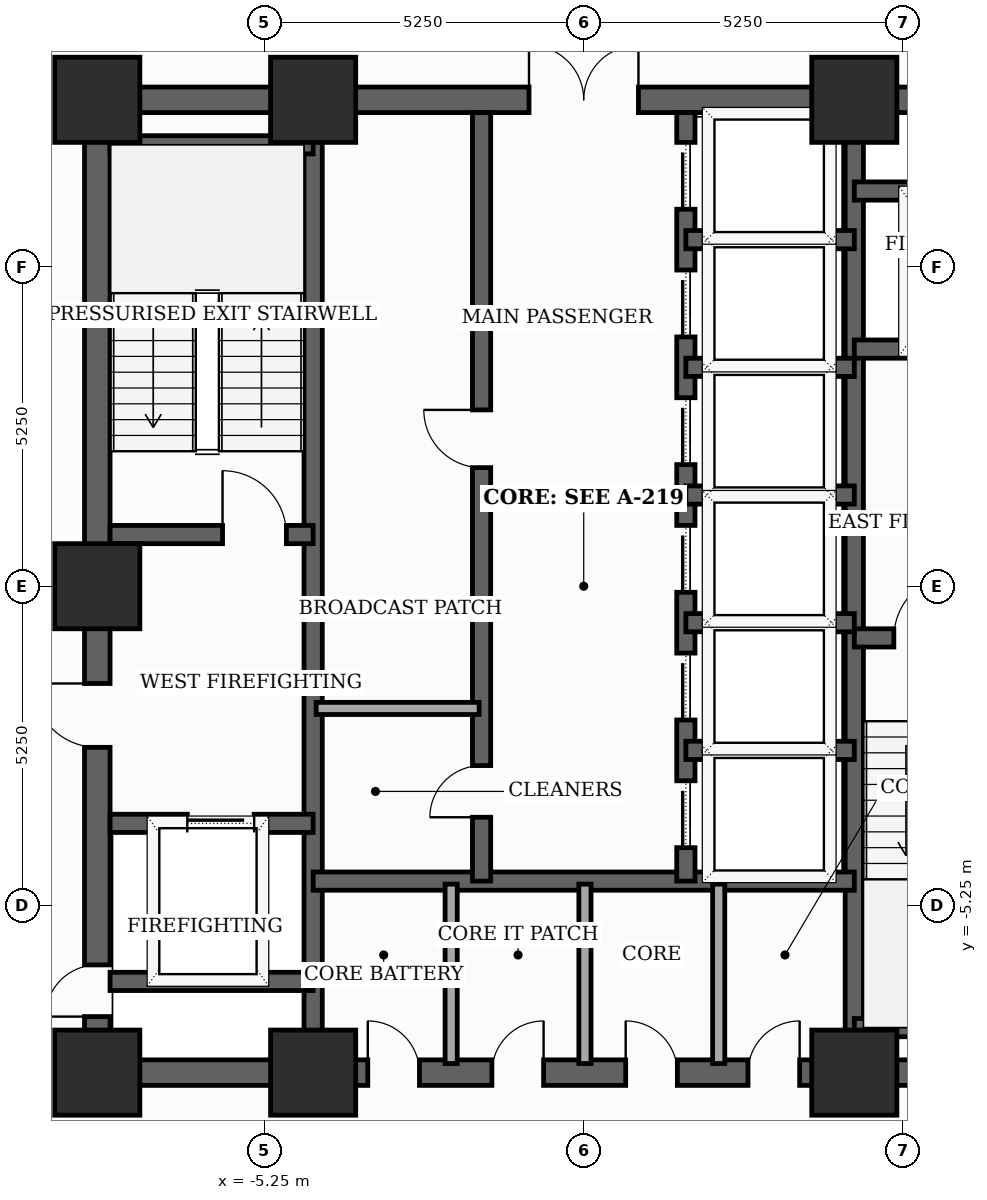
"""IFC4 building model, lengths in metres.
Left out: names, types, materials, properties, quantities, classifications, styles, units other than length and angle.
Written with IfcOpenShell. Run it as: python <this file> out.ifc"""

import sys

from ifc_helpers import new_model, si_unit, direction, frame, frame_2d, origin, origin_2d, place, context, subcontext, project, spatial, rectangle, extrude, element, fill, save


model = new_model("IFC4")
c1 = context("Model", 3, precision=1e-05, world=origin(), true_north=direction((0.0, 1.0)))
c2 = subcontext(c1, "Body", "Model", "MODEL_VIEW")
j1 = project(units=[si_unit("LENGTHUNIT", "METRE"), si_unit("PLANEANGLEUNIT", "RADIAN")], contexts=[c1])
p1 = place(None, origin())
s1 = spatial("IfcSite", under=j1, at=p1, CompositionType="ELEMENT")
p2 = place(p1, origin())
s2 = spatial("IfcBuilding", under=s1, at=p2, CompositionType="ELEMENT")
p3 = place(p2, frame((0.0, 0.0, 176.8)))
s3 = spatial("IfcBuildingStorey", under=s2, at=p3, CompositionType="ELEMENT", Elevation=176.8)
for number, where, z_axis, x_axis in (
    (1, (-8.0, -8.0, 0.0), (0.0, 0.0, 1.0), (1.0, 0.0, 0.0)),
    (2, (-4.45, -8.0, 0.0), (0.0, 0.0, 1.0), (1.0, 0.0, 0.0)),
    (3, (4.45, -8.0, 0.0), (0.0, 0.0, 1.0), (1.0, 0.0, 0.0)),
    (4, (4.45, 8.0, 0.0), (0.0, 0.0, 1.0), (1.0, 0.0, 0.0)),
    (5, (-4.45, 8.0, 0.0), (0.0, 0.0, 1.0), (1.0, 0.0, 0.0)),
    (6, (-8.0, 8.0, 0.0), (0.0, 0.0, 1.0), (1.0, 0.0, 0.0)),
    (7, (-8.0, 0.0, 0.0), (0.0, 0.0, 1.0), (1.0, 0.0, 0.0)),
):
    element("IfcColumn", number, at=place(p3, frame(where, z_axis=z_axis, x_axis=x_axis)), inside=s3, PredefinedType="COLUMN", context=c2, shape_type="SweptSolid", body=[
        extrude(rectangle(XDim=1.4, YDim=1.4, at=origin_2d()), origin(), (0.0, 0.0, 1.0), 3.7),
    ])
p4 = place(p3, frame((-8.0, -8.0, 0.0), z_axis=(0.0, 0.0, 1.0), x_axis=(0.0, 1.0, 0.0)))
e8 = element("IfcWall", 8, at=p4, inside=s3, PredefinedType="SHEAR", context=c2, shape_type="SweptSolid", body=[
    extrude(rectangle(XDim=16.0, YDim=0.42, at=frame_2d((8.0, 0.0))), origin(), (0.0, 0.0, 1.0), 3.5),
])
p5 = place(p4, frame((0.922, 0.0, 0.0)))
e9 = element("IfcOpeningElement", 9, at=p5, cuts=e8, PredefinedType="OPENING", context=c2, shape_type="SweptSolid", body=[
    extrude(rectangle(XDim=0.85, YDim=2.02, at=frame_2d((0.425, 1.01))), frame((0.0, 0.22, 0.0), z_axis=(0.0, -1.0, 0.0), x_axis=(1.0, 0.0, 0.0)), (0.0, 0.0, 1.0), 0.44),
])
p6 = place(p4, frame((5.35, 0.0, 0.0)))
e10 = element("IfcOpeningElement", 10, at=p6, cuts=e8, PredefinedType="OPENING", context=c2, shape_type="SweptSolid", body=[
    extrude(rectangle(XDim=1.05, YDim=2.15, at=frame_2d((0.525, 1.075))), frame((0.0, 0.22, 0.0), z_axis=(0.0, -1.0, 0.0), x_axis=(1.0, 0.0, 0.0)), (0.0, 0.0, 1.0), 0.44),
])
p7 = place(p3, frame((-8.0, -8.0, 0.0), z_axis=(0.0, 0.0, 1.0), x_axis=(1.0, 0.0, 0.0)))
e11 = element("IfcWall", 11, at=p7, inside=s3, PredefinedType="SHEAR", context=c2, shape_type="SweptSolid", body=[
    extrude(rectangle(XDim=16.0, YDim=0.42, at=frame_2d((8.0, 0.0))), origin(), (0.0, 0.0, 1.0), 3.5),
])
p8 = place(p7, frame((4.449, 0.0, 0.0)))
e12 = element("IfcOpeningElement", 12, at=p8, cuts=e11, PredefinedType="OPENING", context=c2, shape_type="SweptSolid", body=[
    extrude(rectangle(XDim=0.85, YDim=2.02, at=frame_2d((0.425, 1.01))), frame((0.0, 0.22, 0.0), z_axis=(0.0, -1.0, 0.0), x_axis=(1.0, 0.0, 0.0)), (0.0, 0.0, 1.0), 0.44),
])
p9 = place(p7, frame((6.49, 0.0, 0.0)))
e13 = element("IfcOpeningElement", 13, at=p9, cuts=e11, PredefinedType="OPENING", context=c2, shape_type="SweptSolid", body=[
    extrude(rectangle(XDim=0.85, YDim=2.02, at=frame_2d((0.425, 1.01))), frame((0.0, 0.22, 0.0), z_axis=(0.0, -1.0, 0.0), x_axis=(1.0, 0.0, 0.0)), (0.0, 0.0, 1.0), 0.44),
])
p10 = place(p7, frame((8.69, 0.0, 0.0)))
e14 = element("IfcOpeningElement", 14, at=p10, cuts=e11, PredefinedType="OPENING", context=c2, shape_type="SweptSolid", body=[
    extrude(rectangle(XDim=0.85, YDim=2.02, at=frame_2d((0.425, 1.01))), frame((0.0, 0.22, 0.0), z_axis=(0.0, -1.0, 0.0), x_axis=(1.0, 0.0, 0.0)), (0.0, 0.0, 1.0), 0.44),
])
p11 = place(p7, frame((10.701, 0.0, 0.0)))
e15 = element("IfcOpeningElement", 15, at=p11, cuts=e11, PredefinedType="OPENING", context=c2, shape_type="SweptSolid", body=[
    extrude(rectangle(XDim=0.85, YDim=2.02, at=frame_2d((0.425, 1.01))), frame((0.0, 0.22, 0.0), z_axis=(0.0, -1.0, 0.0), x_axis=(1.0, 0.0, 0.0)), (0.0, 0.0, 1.0), 0.44),
])
p12 = place(p3, frame((-8.0, 8.0, 0.0), z_axis=(0.0, 0.0, 1.0), x_axis=(1.0, 0.0, 0.0)))
e16 = element("IfcWall", 16, at=p12, inside=s3, PredefinedType="SHEAR", context=c2, shape_type="SweptSolid", body=[
    extrude(rectangle(XDim=16.0, YDim=0.42, at=frame_2d((8.0, 0.0))), origin(), (0.0, 0.0, 1.0), 3.5),
])
p13 = place(p12, frame((7.1, 0.0, 0.0)))
e17 = element("IfcOpeningElement", 17, at=p13, cuts=e16, PredefinedType="OPENING", context=c2, shape_type="SweptSolid", body=[
    extrude(rectangle(XDim=1.8, YDim=2.15, at=frame_2d((0.9, 1.075))), frame((0.0, 0.22, 0.0), z_axis=(0.0, -1.0, 0.0), x_axis=(1.0, 0.0, 0.0)), (0.0, 0.0, 1.0), 0.44),
])
for number, where, z_axis, x_axis in (
    (18, (-4.45, -7.79, 0.0), (0.0, 0.0, 1.0), (0.0, 1.0, 0.0)),
    (19, (4.45, -7.79, 0.0), (0.0, 0.0, 1.0), (0.0, 1.0, 0.0)),
):
    element("IfcWall", number, at=place(p3, frame(where, z_axis=z_axis, x_axis=x_axis)), inside=s3, PredefinedType="SHEAR", context=c2, shape_type="SweptSolid", body=[
        extrude(rectangle(XDim=15.58, YDim=0.3, at=frame_2d((7.79, 0.0))), origin(), (0.0, 0.0, 1.0), 3.5),
    ])
p14 = place(p3, frame((-7.79, 0.85, 0.0), z_axis=(0.0, 0.0, 1.0), x_axis=(1.0, 0.0, 0.0)))
e20 = element("IfcWall", 20, at=p14, inside=s3, PredefinedType="SHEAR", context=c2, shape_type="SweptSolid", body=[
    extrude(rectangle(XDim=3.34, YDim=0.3, at=frame_2d((1.67, 0.0))), origin(), (0.0, 0.0, 1.0), 3.5),
])
p15 = place(p14, frame((1.85, 0.0, 0.0)))
e21 = element("IfcOpeningElement", 21, at=p15, cuts=e20, PredefinedType="OPENING", context=c2, shape_type="SweptSolid", body=[
    extrude(rectangle(XDim=1.05, YDim=2.15, at=frame_2d((0.525, 1.075))), frame((0.0, 0.16, 0.0), z_axis=(0.0, -1.0, 0.0), x_axis=(1.0, 0.0, 0.0)), (0.0, 0.0, 1.0), 0.32),
])
p16 = place(p3, frame((-7.79, 7.26, 0.0), z_axis=(0.0, 0.0, 1.0), x_axis=(1.0, 0.0, 0.0)))
e22 = element("IfcWall", 22, at=p16, inside=s3, PredefinedType="SHEAR", context=c2, shape_type="SweptSolid", body=[
    extrude(rectangle(XDim=3.34, YDim=0.3, at=frame_2d((1.67, 0.0))), origin(), (0.0, 0.0, 1.0), 3.5),
])
p17 = place(p3, frame((4.45, -0.85, 0.0), z_axis=(0.0, 0.0, 1.0), x_axis=(1.0, 0.0, 0.0)))
e23 = element("IfcWall", 23, at=p17, inside=s3, PredefinedType="SHEAR", context=c2, shape_type="SweptSolid", body=[
    extrude(rectangle(XDim=3.34, YDim=0.3, at=frame_2d((1.67, 0.0))), origin(), (0.0, 0.0, 1.0), 3.5),
])
p18 = place(p17, frame((0.65, 0.0, 0.0)))
e24 = element("IfcOpeningElement", 24, at=p18, cuts=e23, PredefinedType="OPENING", context=c2, shape_type="SweptSolid", body=[
    extrude(rectangle(XDim=1.05, YDim=2.15, at=frame_2d((0.525, 1.075))), frame((0.0, 0.16, 0.0), z_axis=(0.0, -1.0, 0.0), x_axis=(1.0, 0.0, 0.0)), (0.0, 0.0, 1.0), 0.32),
])
p19 = place(p3, frame((4.45, -7.26, 0.0), z_axis=(0.0, 0.0, 1.0), x_axis=(1.0, 0.0, 0.0)))
e25 = element("IfcWall", 25, at=p19, inside=s3, PredefinedType="SHEAR", context=c2, shape_type="SweptSolid", body=[
    extrude(rectangle(XDim=3.55, YDim=0.3, at=frame_2d((1.775, 0.0))), origin(), (0.0, 0.0, 1.0), 3.5),
])
p20 = place(p3, frame((-7.79, -3.9, 0.0), z_axis=(0.0, 0.0, 1.0), x_axis=(1.0, 0.0, 0.0)))
e26 = element("IfcWall", 26, at=p20, inside=s3, PredefinedType="SHEAR", context=c2, shape_type="SweptSolid", body=[
    extrude(rectangle(XDim=3.34, YDim=0.3, at=frame_2d((1.67, 0.0))), origin(), (0.0, 0.0, 1.0), 3.5),
])
p21 = place(p20, frame((1.27, 0.0, 0.0)))
e27 = element("IfcOpeningElement", 27, at=p21, cuts=e26, PredefinedType="OPENING", context=c2, shape_type="SweptSolid", body=[
    extrude(rectangle(XDim=1.1, YDim=2.1, at=frame_2d((0.55, 1.05))), frame((0.0, 0.16, 0.0), z_axis=(0.0, -1.0, 0.0), x_axis=(1.0, 0.0, 0.0)), (0.0, 0.0, 1.0), 0.32),
])
p22 = place(p3, frame((-7.79, -6.5, 0.0), z_axis=(0.0, 0.0, 1.0), x_axis=(1.0, 0.0, 0.0)))
e28 = element("IfcWall", 28, at=p22, inside=s3, PredefinedType="SHEAR", context=c2, shape_type="SweptSolid", body=[
    extrude(rectangle(XDim=3.34, YDim=0.3, at=frame_2d((1.67, 0.0))), origin(), (0.0, 0.0, 1.0), 3.5),
])
p23 = place(p3, frame((4.45, 3.9, 0.0), z_axis=(0.0, 0.0, 1.0), x_axis=(1.0, 0.0, 0.0)))
e29 = element("IfcWall", 29, at=p23, inside=s3, PredefinedType="SHEAR", context=c2, shape_type="SweptSolid", body=[
    extrude(rectangle(XDim=3.34, YDim=0.3, at=frame_2d((1.67, 0.0))), origin(), (0.0, 0.0, 1.0), 3.5),
])
p24 = place(p23, frame((1.18, 0.0, 0.0)))
e30 = element("IfcOpeningElement", 30, at=p24, cuts=e29, PredefinedType="OPENING", context=c2, shape_type="SweptSolid", body=[
    extrude(rectangle(XDim=1.1, YDim=2.1, at=frame_2d((0.55, 1.05))), frame((0.0, 0.16, 0.0), z_axis=(0.0, -1.0, 0.0), x_axis=(1.0, 0.0, 0.0)), (0.0, 0.0, 1.0), 0.32),
])
p25 = place(p3, frame((4.45, 6.5, 0.0), z_axis=(0.0, 0.0, 1.0), x_axis=(1.0, 0.0, 0.0)))
e31 = element("IfcWall", 31, at=p25, inside=s3, PredefinedType="SHEAR", context=c2, shape_type="SweptSolid", body=[
    extrude(rectangle(XDim=3.34, YDim=0.3, at=frame_2d((1.67, 0.0))), origin(), (0.0, 0.0, 1.0), 3.5),
])
p26 = place(p3, frame((-4.45, -4.85, 0.0), z_axis=(0.0, 0.0, 1.0), x_axis=(1.0, 0.0, 0.0)))
e32 = element("IfcWall", 32, at=p26, inside=s3, PredefinedType="SHEAR", context=c2, shape_type="SweptSolid", body=[
    extrude(rectangle(XDim=8.9, YDim=0.3, at=frame_2d((4.45, 0.0))), origin(), (0.0, 0.0, 1.0), 3.5),
])
p27 = place(p3, frame((-1.68, -4.85, 0.0), z_axis=(0.0, 0.0, 1.0), x_axis=(0.0, 1.0, 0.0)))
e33 = element("IfcWall", 33, at=p27, inside=s3, PredefinedType="SHEAR", context=c2, shape_type="SweptSolid", body=[
    extrude(rectangle(XDim=12.64, YDim=0.3, at=frame_2d((6.32, 0.0))), origin(), (0.0, 0.0, 1.0), 3.5),
])
p28 = place(p27, frame((1.05, 0.0, 0.0)))
e34 = element("IfcOpeningElement", 34, at=p28, cuts=e33, PredefinedType="OPENING", context=c2, shape_type="SweptSolid", body=[
    extrude(rectangle(XDim=0.85, YDim=2.02, at=frame_2d((0.425, 1.01))), frame((0.0, 0.16, 0.0), z_axis=(0.0, -1.0, 0.0), x_axis=(1.0, 0.0, 0.0)), (0.0, 0.0, 1.0), 0.32),
])
p29 = place(p27, frame((6.8, 0.0, 0.0)))
e35 = element("IfcOpeningElement", 35, at=p29, cuts=e33, PredefinedType="OPENING", context=c2, shape_type="SweptSolid", body=[
    extrude(rectangle(XDim=0.95, YDim=2.1, at=frame_2d((0.475, 1.05))), frame((0.0, 0.16, 0.0), z_axis=(0.0, -1.0, 0.0), x_axis=(1.0, 0.0, 0.0)), (0.0, 0.0, 1.0), 0.32),
])
p30 = place(p3, frame((1.68, -4.85, 0.0), z_axis=(0.0, 0.0, 1.0), x_axis=(0.0, 1.0, 0.0)))
e36 = element("IfcWall", 36, at=p30, inside=s3, PredefinedType="SHEAR", context=c2, shape_type="SweptSolid", body=[
    extrude(rectangle(XDim=12.64, YDim=0.3, at=frame_2d((6.32, 0.0))), origin(), (0.0, 0.0, 1.0), 3.5),
])
p31 = place(p30, frame((0.55, 0.0, 0.0)))
e37 = element("IfcOpeningElement", 37, at=p31, cuts=e36, PredefinedType="OPENING", context=c2, shape_type="SweptSolid", body=[
    extrude(rectangle(XDim=1.1, YDim=2.1, at=frame_2d((0.55, 1.05))), frame((0.0, 0.16, 0.0), z_axis=(0.0, -1.0, 0.0), x_axis=(1.0, 0.0, 0.0)), (0.0, 0.0, 1.0), 0.32),
])
p32 = place(p30, frame((2.65, 0.0, 0.0)))
e38 = element("IfcOpeningElement", 38, at=p32, cuts=e36, PredefinedType="OPENING", context=c2, shape_type="SweptSolid", body=[
    extrude(rectangle(XDim=1.1, YDim=2.1, at=frame_2d((0.55, 1.05))), frame((0.0, 0.16, 0.0), z_axis=(0.0, -1.0, 0.0), x_axis=(1.0, 0.0, 0.0)), (0.0, 0.0, 1.0), 0.32),
])
p33 = place(p30, frame((4.75, 0.0, 0.0)))
e39 = element("IfcOpeningElement", 39, at=p33, cuts=e36, PredefinedType="OPENING", context=c2, shape_type="SweptSolid", body=[
    extrude(rectangle(XDim=1.1, YDim=2.1, at=frame_2d((0.55, 1.05))), frame((0.0, 0.16, 0.0), z_axis=(0.0, -1.0, 0.0), x_axis=(1.0, 0.0, 0.0)), (0.0, 0.0, 1.0), 0.32),
])
p34 = place(p30, frame((6.85, 0.0, 0.0)))
e40 = element("IfcOpeningElement", 40, at=p34, cuts=e36, PredefinedType="OPENING", context=c2, shape_type="SweptSolid", body=[
    extrude(rectangle(XDim=1.1, YDim=2.1, at=frame_2d((0.55, 1.05))), frame((0.0, 0.16, 0.0), z_axis=(0.0, -1.0, 0.0), x_axis=(1.0, 0.0, 0.0)), (0.0, 0.0, 1.0), 0.32),
])
p35 = place(p30, frame((8.95, 0.0, 0.0)))
e41 = element("IfcOpeningElement", 41, at=p35, cuts=e36, PredefinedType="OPENING", context=c2, shape_type="SweptSolid", body=[
    extrude(rectangle(XDim=1.1, YDim=2.1, at=frame_2d((0.55, 1.05))), frame((0.0, 0.16, 0.0), z_axis=(0.0, -1.0, 0.0), x_axis=(1.0, 0.0, 0.0)), (0.0, 0.0, 1.0), 0.32),
])
p36 = place(p30, frame((11.05, 0.0, 0.0)))
e42 = element("IfcOpeningElement", 42, at=p36, cuts=e36, PredefinedType="OPENING", context=c2, shape_type="SweptSolid", body=[
    extrude(rectangle(XDim=1.1, YDim=2.1, at=frame_2d((0.55, 1.05))), frame((0.0, 0.16, 0.0), z_axis=(0.0, -1.0, 0.0), x_axis=(1.0, 0.0, 0.0)), (0.0, 0.0, 1.0), 0.32),
])
for number, where, z_axis, x_axis in (
    (43, (1.68, 1.5, 0.0), (0.0, 0.0, 1.0), (1.0, 0.0, 0.0)),
    (44, (1.68, 3.6, 0.0), (0.0, 0.0, 1.0), (1.0, 0.0, 0.0)),
    (45, (1.68, 5.7, 0.0), (0.0, 0.0, 1.0), (1.0, 0.0, 0.0)),
    (46, (1.68, -2.7, 0.0), (0.0, 0.0, 1.0), (1.0, 0.0, 0.0)),
    (47, (1.68, -0.6, 0.0), (0.0, 0.0, 1.0), (1.0, 0.0, 0.0)),
):
    element("IfcWall", number, at=place(p3, frame(where, z_axis=z_axis, x_axis=x_axis)), inside=s3, PredefinedType="SHEAR", context=c2, shape_type="SweptSolid", body=[
        extrude(rectangle(XDim=2.77, YDim=0.3, at=frame_2d((1.385, 0.0))), origin(), (0.0, 0.0, 1.0), 3.5),
    ])
for number, where, z_axis, x_axis in (
    (48, (-2.18, -7.85, 0.0), (0.0, 0.0, 1.0), (0.0, 1.0, 0.0)),
    (49, (0.02, -7.85, 0.0), (0.0, 0.0, 1.0), (0.0, 1.0, 0.0)),
    (50, (2.22, -7.85, 0.0), (0.0, 0.0, 1.0), (0.0, 1.0, 0.0)),
):
    element("IfcWall", number, at=place(p3, frame(where, z_axis=z_axis, x_axis=x_axis)), inside=s3, PredefinedType="SOLIDWALL", context=c2, shape_type="SweptSolid", body=[
        extrude(rectangle(XDim=2.95, YDim=0.2, at=frame_2d((1.475, 0.0))), origin(), (0.0, 0.0, 1.0), 2.885),
    ])
p37 = place(p3, frame((-4.4, -2.01, 0.0), z_axis=(0.0, 0.0, 1.0), x_axis=(1.0, 0.0, 0.0)))
e51 = element("IfcWall", 51, at=p37, inside=s3, PredefinedType="SOLIDWALL", context=c2, shape_type="SweptSolid", body=[
    extrude(rectangle(XDim=2.68, YDim=0.2, at=frame_2d((1.34, 0.0))), origin(), (0.0, 0.0, 1.0), 3.5),
])
p38 = place(p5, origin())
e52 = element("IfcDoor", 52, at=p38, inside=s3, OperationType="SINGLE_SWING_LEFT", PredefinedType="TRAPDOOR", context=c2, shape_type="SweptSolid", body=[
    extrude(rectangle(XDim=0.85, YDim=2.02, at=frame_2d((0.425, 1.01))), frame((0.0, 0.025, 0.0), z_axis=(0.0, -1.0, 0.0), x_axis=(1.0, 0.0, 0.0)), (0.0, 0.0, 1.0), 0.05),
])
fill(e9, e52)
p39 = place(p6, origin())
e53 = element("IfcDoor", 53, at=p39, inside=s3, OperationType="SINGLE_SWING_RIGHT", PredefinedType="DOOR", context=c2, shape_type="SweptSolid", body=[
    extrude(rectangle(XDim=1.05, YDim=2.15, at=frame_2d((0.525, 1.075))), frame((0.0, 0.025, 0.0), z_axis=(0.0, -1.0, 0.0), x_axis=(1.0, 0.0, 0.0)), (0.0, 0.0, 1.0), 0.05),
])
fill(e10, e53)
p40 = place(p8, origin())
e54 = element("IfcDoor", 54, at=p40, inside=s3, OperationType="SINGLE_SWING_LEFT", PredefinedType="TRAPDOOR", context=c2, shape_type="SweptSolid", body=[
    extrude(rectangle(XDim=0.85, YDim=2.02, at=frame_2d((0.425, 1.01))), frame((0.0, 0.025, 0.0), z_axis=(0.0, -1.0, 0.0), x_axis=(1.0, 0.0, 0.0)), (0.0, 0.0, 1.0), 0.05),
])
fill(e12, e54)
p41 = place(p9, origin())
e55 = element("IfcDoor", 55, at=p41, inside=s3, OperationType="SINGLE_SWING_RIGHT", PredefinedType="TRAPDOOR", context=c2, shape_type="SweptSolid", body=[
    extrude(rectangle(XDim=0.85, YDim=2.02, at=frame_2d((0.425, 1.01))), frame((0.0, 0.025, 0.0), z_axis=(0.0, -1.0, 0.0), x_axis=(1.0, 0.0, 0.0)), (0.0, 0.0, 1.0), 0.05),
])
fill(e13, e55)
p42 = place(p10, origin())
e56 = element("IfcDoor", 56, at=p42, inside=s3, OperationType="SINGLE_SWING_LEFT", PredefinedType="TRAPDOOR", context=c2, shape_type="SweptSolid", body=[
    extrude(rectangle(XDim=0.85, YDim=2.02, at=frame_2d((0.425, 1.01))), frame((0.0, 0.025, 0.0), z_axis=(0.0, -1.0, 0.0), x_axis=(1.0, 0.0, 0.0)), (0.0, 0.0, 1.0), 0.05),
])
fill(e14, e56)
p43 = place(p11, origin())
e57 = element("IfcDoor", 57, at=p43, inside=s3, OperationType="SINGLE_SWING_RIGHT", PredefinedType="TRAPDOOR", context=c2, shape_type="SweptSolid", body=[
    extrude(rectangle(XDim=0.85, YDim=2.02, at=frame_2d((0.425, 1.01))), frame((0.0, 0.025, 0.0), z_axis=(0.0, -1.0, 0.0), x_axis=(1.0, 0.0, 0.0)), (0.0, 0.0, 1.0), 0.05),
])
fill(e15, e57)
p44 = place(p13, origin())
e58 = element("IfcDoor", 58, at=p44, inside=s3, OperationType="DOUBLE_DOOR_SINGLE_SWING", PredefinedType="DOOR", context=c2, shape_type="SweptSolid", body=[
    extrude(rectangle(XDim=1.8, YDim=2.15, at=frame_2d((0.9, 1.075))), frame((0.0, 0.025, 0.0), z_axis=(0.0, -1.0, 0.0), x_axis=(1.0, 0.0, 0.0)), (0.0, 0.0, 1.0), 0.05),
])
fill(e17, e58)
p45 = place(p15, origin())
e59 = element("IfcDoor", 59, at=p45, inside=s3, OperationType="SINGLE_SWING_LEFT", PredefinedType="DOOR", context=c2, shape_type="SweptSolid", body=[
    extrude(rectangle(XDim=1.05, YDim=2.15, at=frame_2d((0.525, 1.075))), frame((0.0, 0.025, 0.0), z_axis=(0.0, -1.0, 0.0), x_axis=(1.0, 0.0, 0.0)), (0.0, 0.0, 1.0), 0.05),
])
fill(e21, e59)
p46 = place(p18, origin())
e60 = element("IfcDoor", 60, at=p46, inside=s3, OperationType="SINGLE_SWING_RIGHT", PredefinedType="DOOR", context=c2, shape_type="SweptSolid", body=[
    extrude(rectangle(XDim=1.05, YDim=2.15, at=frame_2d((0.525, 1.075))), frame((0.0, 0.025, 0.0), z_axis=(0.0, -1.0, 0.0), x_axis=(1.0, 0.0, 0.0)), (0.0, 0.0, 1.0), 0.05),
])
fill(e24, e60)
p47 = place(p21, origin())
e61 = element("IfcDoor", 61, at=p47, inside=s3, OperationType="SLIDING_TO_LEFT", PredefinedType="DOOR", context=c2, shape_type="SweptSolid", body=[
    extrude(rectangle(XDim=1.1, YDim=2.1, at=frame_2d((0.55, 1.05))), frame((0.0, 0.025, 0.0), z_axis=(0.0, -1.0, 0.0), x_axis=(1.0, 0.0, 0.0)), (0.0, 0.0, 1.0), 0.05),
])
fill(e27, e61)
p48 = place(p28, origin())
e62 = element("IfcDoor", 62, at=p48, inside=s3, OperationType="SINGLE_SWING_LEFT", PredefinedType="TRAPDOOR", context=c2, shape_type="SweptSolid", body=[
    extrude(rectangle(XDim=0.85, YDim=2.02, at=frame_2d((0.425, 1.01))), frame((0.0, 0.025, 0.0), z_axis=(0.0, -1.0, 0.0), x_axis=(1.0, 0.0, 0.0)), (0.0, 0.0, 1.0), 0.05),
])
fill(e34, e62)
p49 = place(p29, origin())
e63 = element("IfcDoor", 63, at=p49, inside=s3, OperationType="SINGLE_SWING_RIGHT", PredefinedType="DOOR", context=c2, shape_type="SweptSolid", body=[
    extrude(rectangle(XDim=0.95, YDim=2.1, at=frame_2d((0.475, 1.05))), frame((0.0, 0.025, 0.0), z_axis=(0.0, -1.0, 0.0), x_axis=(1.0, 0.0, 0.0)), (0.0, 0.0, 1.0), 0.05),
])
fill(e35, e63)
p50 = place(p31, origin())
e64 = element("IfcDoor", 64, at=p50, inside=s3, OperationType="SLIDING_TO_LEFT", PredefinedType="DOOR", context=c2, shape_type="SweptSolid", body=[
    extrude(rectangle(XDim=1.1, YDim=2.1, at=frame_2d((0.55, 1.05))), frame((0.0, 0.025, 0.0), z_axis=(0.0, -1.0, 0.0), x_axis=(1.0, 0.0, 0.0)), (0.0, 0.0, 1.0), 0.05),
])
fill(e37, e64)
p51 = place(p32, origin())
e65 = element("IfcDoor", 65, at=p51, inside=s3, OperationType="SLIDING_TO_LEFT", PredefinedType="DOOR", context=c2, shape_type="SweptSolid", body=[
    extrude(rectangle(XDim=1.1, YDim=2.1, at=frame_2d((0.55, 1.05))), frame((0.0, 0.025, 0.0), z_axis=(0.0, -1.0, 0.0), x_axis=(1.0, 0.0, 0.0)), (0.0, 0.0, 1.0), 0.05),
])
fill(e38, e65)
p52 = place(p33, origin())
e66 = element("IfcDoor", 66, at=p52, inside=s3, OperationType="SLIDING_TO_LEFT", PredefinedType="DOOR", context=c2, shape_type="SweptSolid", body=[
    extrude(rectangle(XDim=1.1, YDim=2.1, at=frame_2d((0.55, 1.05))), frame((0.0, 0.025, 0.0), z_axis=(0.0, -1.0, 0.0), x_axis=(1.0, 0.0, 0.0)), (0.0, 0.0, 1.0), 0.05),
])
fill(e39, e66)
p53 = place(p34, origin())
e67 = element("IfcDoor", 67, at=p53, inside=s3, OperationType="SLIDING_TO_LEFT", PredefinedType="DOOR", context=c2, shape_type="SweptSolid", body=[
    extrude(rectangle(XDim=1.1, YDim=2.1, at=frame_2d((0.55, 1.05))), frame((0.0, 0.025, 0.0), z_axis=(0.0, -1.0, 0.0), x_axis=(1.0, 0.0, 0.0)), (0.0, 0.0, 1.0), 0.05),
])
fill(e40, e67)
p54 = place(p35, origin())
e68 = element("IfcDoor", 68, at=p54, inside=s3, OperationType="SLIDING_TO_LEFT", PredefinedType="DOOR", context=c2, shape_type="SweptSolid", body=[
    extrude(rectangle(XDim=1.1, YDim=2.1, at=frame_2d((0.55, 1.05))), frame((0.0, 0.025, 0.0), z_axis=(0.0, -1.0, 0.0), x_axis=(1.0, 0.0, 0.0)), (0.0, 0.0, 1.0), 0.05),
])
fill(e41, e68)
p55 = place(p36, origin())
e69 = element("IfcDoor", 69, at=p55, inside=s3, OperationType="SLIDING_TO_LEFT", PredefinedType="DOOR", context=c2, shape_type="SweptSolid", body=[
    extrude(rectangle(XDim=1.1, YDim=2.1, at=frame_2d((0.55, 1.05))), frame((0.0, 0.025, 0.0), z_axis=(0.0, -1.0, 0.0), x_axis=(1.0, 0.0, 0.0)), (0.0, 0.0, 1.0), 0.05),
])
fill(e42, e69)
save(model, sys.argv[1])
